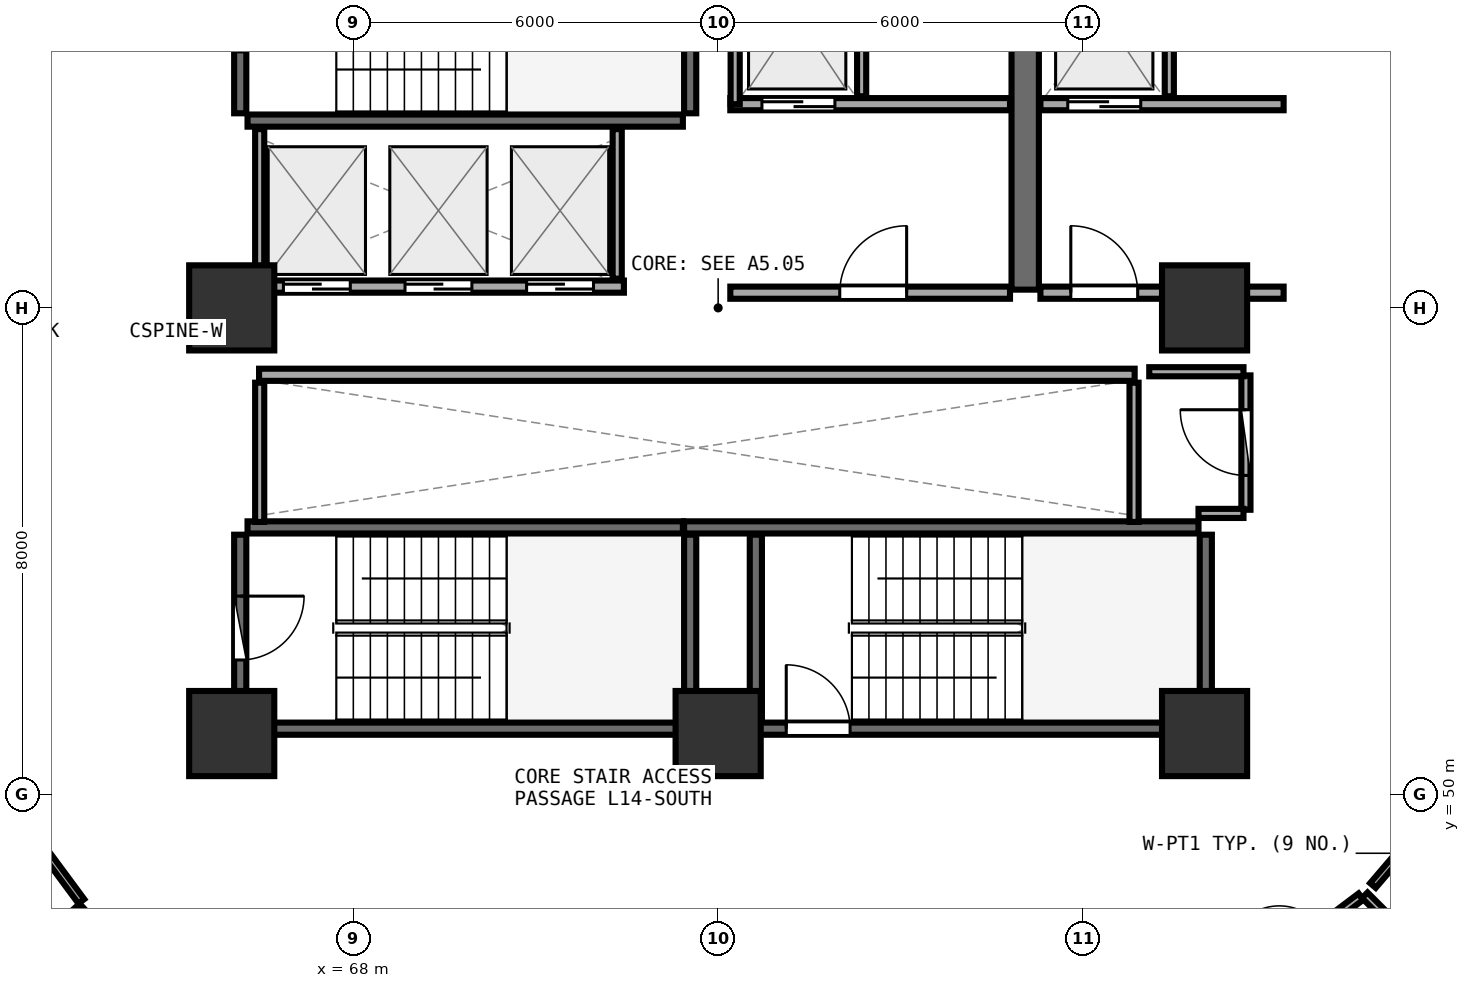
"""IFC4 building model, lengths in metres.
Left out: names, types, materials, properties, quantities, classifications, styles, units other than length and angle.
Written with IfcOpenShell. Run it as: python <this file> out.ifc"""

import sys

from ifc_helpers import new_model, si_unit, direction, frame, frame_2d, origin, origin_2d, place, context, subcontext, project, spatial, rectangle, extrude, element, fill, save


model = new_model("IFC4")
c1 = context("Model", 3, precision=1e-05, world=origin(), true_north=direction((0.0, 1.0)))
c2 = subcontext(c1, "Body", "Model", "MODEL_VIEW")
j1 = project(units=[si_unit("LENGTHUNIT", "METRE"), si_unit("PLANEANGLEUNIT", "RADIAN")], contexts=[c1])
p1 = place(None, origin())
s1 = spatial("IfcSite", under=j1, at=p1, CompositionType="ELEMENT")
p2 = place(p1, origin())
s2 = spatial("IfcBuilding", under=s1, at=p2, CompositionType="ELEMENT")
p3 = place(p2, frame((0.0, 0.0, 56.25)))
s3 = spatial("IfcBuildingStorey", under=s2, at=p3, CompositionType="ELEMENT", Elevation=56.25)
for number, where, z_axis, x_axis in (
    (1, (66.0, 51.0, 0.0), (0.0, 0.0, 1.0), (1.0, 0.0, 0.0)),
    (2, (74.0, 51.0, 0.0), (0.0, 0.0, 1.0), (1.0, 0.0, 0.0)),
    (3, (82.0, 51.0, 0.0), (0.0, 0.0, 1.0), (1.0, 0.0, 0.0)),
    (4, (82.0, 58.0, 0.0), (0.0, 0.0, 1.0), (1.0, 0.0, 0.0)),
    (5, (66.0, 58.0, 0.0), (0.0, 0.0, 1.0), (1.0, 0.0, 0.0)),
):
    element("IfcColumn", number, at=place(p3, frame(where, z_axis=z_axis, x_axis=x_axis)), inside=s3, PredefinedType="PILASTER", context=c2, shape_type="SweptSolid", body=[
        extrude(rectangle(XDim=1.4, YDim=1.4, at=origin_2d()), origin(), (0.0, 0.0, 1.0), 3.75),
    ])
p4 = place(p3, frame((66.26, 61.08, 0.0), z_axis=(0.0, 0.0, 1.0), x_axis=(1.0, 0.0, 0.0)))
e6 = element("IfcWall", 6, at=p4, inside=s3, PredefinedType="SHEAR", context=c2, shape_type="SweptSolid", body=[
    extrude(rectangle(XDim=7.16, YDim=0.2, at=frame_2d((3.58, 0.0))), origin(), (0.0, 0.0, 1.0), 3.49),
])
p5 = place(p3, frame((73.54, 61.2, 0.0), z_axis=(0.0, 0.0, 1.0), x_axis=(0.0, 1.0, 0.0)))
e7 = element("IfcWall", 7, at=p5, inside=s3, PredefinedType="SHEAR", context=c2, shape_type="SweptSolid", body=[
    extrude(rectangle(XDim=3.07, YDim=0.2, at=frame_2d((1.535, 0.0))), origin(), (0.0, 0.0, 1.0), 3.49),
])
p6 = place(p3, frame((66.14, 64.27, 0.0), z_axis=(0.0, 0.0, 1.0), x_axis=(0.0, -1.0, 0.0)))
e8 = element("IfcWall", 8, at=p6, inside=s3, PredefinedType="SHEAR", context=c2, shape_type="SweptSolid", body=[
    extrude(rectangle(XDim=3.07, YDim=0.2, at=frame_2d((1.535, 0.0))), origin(), (0.0, 0.0, 1.0), 3.49),
])
p7 = place(p6, frame((1.01, 0.0, 0.0)))
e9 = element("IfcOpeningElement", 9, at=p7, cuts=e8, PredefinedType="OPENING", context=c2, shape_type="SweptSolid", body=[
    extrude(rectangle(XDim=1.05, YDim=2.1, at=frame_2d((0.525, 1.05))), frame((0.0, 0.11, 0.0), z_axis=(0.0, -1.0, 0.0), x_axis=(1.0, 0.0, 0.0)), (0.0, 0.0, 1.0), 0.22),
])
p8 = place(p3, frame((74.0, 51.08, 0.0), z_axis=(0.0, 0.0, 1.0), x_axis=(1.0, 0.0, 0.0)))
e10 = element("IfcWall", 10, at=p8, inside=s3, PredefinedType="SHEAR", context=c2, shape_type="SweptSolid", body=[
    extrude(rectangle(XDim=7.9, YDim=0.2, at=frame_2d((3.95, 0.0))), origin(), (0.0, 0.0, 1.0), 3.49),
])
p9 = place(p8, frame((1.12, 0.0, 0.0)))
e11 = element("IfcOpeningElement", 11, at=p9, cuts=e10, PredefinedType="OPENING", context=c2, shape_type="SweptSolid", body=[
    extrude(rectangle(XDim=1.05, YDim=2.1, at=frame_2d((0.525, 1.05))), frame((0.0, 0.11, 0.0), z_axis=(0.0, -1.0, 0.0), x_axis=(1.0, 0.0, 0.0)), (0.0, 0.0, 1.0), 0.22),
])
p10 = place(p3, frame((82.02, 51.2, 0.0), z_axis=(0.0, 0.0, 1.0), x_axis=(0.0, 1.0, 0.0)))
e12 = element("IfcWall", 12, at=p10, inside=s3, PredefinedType="SHEAR", context=c2, shape_type="SweptSolid", body=[
    extrude(rectangle(XDim=3.07, YDim=0.2, at=frame_2d((1.535, 0.0))), origin(), (0.0, 0.0, 1.0), 3.49),
])
p11 = place(p3, frame((81.9, 54.39, 0.0), z_axis=(0.0, 0.0, 1.0), x_axis=(-1.0, 0.0, 0.0)))
e13 = element("IfcWall", 13, at=p11, inside=s3, PredefinedType="SHEAR", context=c2, shape_type="SweptSolid", body=[
    extrude(rectangle(XDim=8.46, YDim=0.2, at=frame_2d((4.23, 0.0))), origin(), (0.0, 0.0, 1.0), 3.49),
])
p12 = place(p3, frame((74.62, 54.27, 0.0), z_axis=(0.0, 0.0, 1.0), x_axis=(0.0, -1.0, 0.0)))
e14 = element("IfcWall", 14, at=p12, inside=s3, PredefinedType="SHEAR", context=c2, shape_type="SweptSolid", body=[
    extrude(rectangle(XDim=3.07, YDim=0.2, at=frame_2d((1.535, 0.0))), origin(), (0.0, 0.0, 1.0), 3.49),
])
p13 = place(p3, frame((66.26, 51.08, 0.0), z_axis=(0.0, 0.0, 1.0), x_axis=(1.0, 0.0, 0.0)))
e15 = element("IfcWall", 15, at=p13, inside=s3, PredefinedType="SHEAR", context=c2, shape_type="SweptSolid", body=[
    extrude(rectangle(XDim=7.16, YDim=0.2, at=frame_2d((3.58, 0.0))), origin(), (0.0, 0.0, 1.0), 3.49),
])
p14 = place(p3, frame((73.54, 51.2, 0.0), z_axis=(0.0, 0.0, 1.0), x_axis=(0.0, 1.0, 0.0)))
e16 = element("IfcWall", 16, at=p14, inside=s3, PredefinedType="SHEAR", context=c2, shape_type="SweptSolid", body=[
    extrude(rectangle(XDim=3.07, YDim=0.2, at=frame_2d((1.535, 0.0))), origin(), (0.0, 0.0, 1.0), 3.49),
])
p15 = place(p3, frame((73.42, 54.39, 0.0), z_axis=(0.0, 0.0, 1.0), x_axis=(-1.0, 0.0, 0.0)))
e17 = element("IfcWall", 17, at=p15, inside=s3, PredefinedType="SHEAR", context=c2, shape_type="SweptSolid", body=[
    extrude(rectangle(XDim=7.16, YDim=0.2, at=frame_2d((3.58, 0.0))), origin(), (0.0, 0.0, 1.0), 3.49),
])
p16 = place(p3, frame((66.14, 54.27, 0.0), z_axis=(0.0, 0.0, 1.0), x_axis=(0.0, -1.0, 0.0)))
e18 = element("IfcWall", 18, at=p16, inside=s3, PredefinedType="SHEAR", context=c2, shape_type="SweptSolid", body=[
    extrude(rectangle(XDim=3.07, YDim=0.2, at=frame_2d((1.535, 0.0))), origin(), (0.0, 0.0, 1.0), 3.49),
])
p17 = place(p16, frame((1.01, 0.0, 0.0)))
e19 = element("IfcOpeningElement", 19, at=p17, cuts=e18, PredefinedType="OPENING", context=c2, shape_type="SweptSolid", body=[
    extrude(rectangle(XDim=1.05, YDim=2.1, at=frame_2d((0.525, 1.05))), frame((0.0, 0.11, 0.0), z_axis=(0.0, -1.0, 0.0), x_axis=(1.0, 0.0, 0.0)), (0.0, 0.0, 1.0), 0.22),
])
p18 = place(p3, frame((79.05, 58.3, 0.0), z_axis=(0.0, 0.0, 1.0), x_axis=(0.0, 1.0, 0.0)))
e20 = element("IfcWall", 20, at=p18, inside=s3, PredefinedType="SHEAR", context=c2, shape_type="SweptSolid", body=[
    extrude(rectangle(XDim=6.3, YDim=0.45, at=frame_2d((3.15, 0.0))), origin(), (0.0, 0.0, 1.0), 3.49),
])
p19 = place(p3, frame((74.2, 61.35, 0.0), z_axis=(0.0, 0.0, 1.0), x_axis=(1.0, 0.0, 0.0)))
e21 = element("IfcWall", 21, at=p19, inside=s3, PredefinedType="SOLIDWALL", context=c2, shape_type="SweptSolid", body=[
    extrude(rectangle(XDim=4.6, YDim=0.2, at=frame_2d((2.3, 0.0))), origin(), (0.0, 0.0, 1.0), 3.48),
])
p20 = place(p19, frame((0.52, 0.0, 0.0)))
e22 = element("IfcOpeningElement", 22, at=p20, cuts=e21, PredefinedType="OPENING", context=c2, shape_type="SweptSolid", body=[
    extrude(rectangle(XDim=1.2, YDim=2.15, at=frame_2d((0.6, 1.075))), frame((0.0, 0.11, 0.0), z_axis=(0.0, -1.0, 0.0), x_axis=(1.0, 0.0, 0.0)), (0.0, 0.0, 1.0), 0.22),
])
p21 = place(p3, frame((74.28, 61.35, 0.0), z_axis=(0.0, 0.0, 1.0), x_axis=(0.0, 1.0, 0.0)))
e23 = element("IfcWall", 23, at=p21, inside=s3, PredefinedType="PARTITIONING", context=c2, shape_type="SweptSolid", body=[
    extrude(rectangle(XDim=2.97, YDim=0.15, at=frame_2d((1.485, 0.0))), origin(), (0.0, 0.0, 1.0), 3.48),
])
p22 = place(p3, frame((76.36, 61.48, 0.0), z_axis=(0.0, 0.0, 1.0), x_axis=(0.0, 1.0, 0.0)))
e24 = element("IfcWall", 24, at=p22, inside=s3, PredefinedType="PARTITIONING", context=c2, shape_type="SweptSolid", body=[
    extrude(rectangle(XDim=2.84, YDim=0.15, at=frame_2d((1.42, 0.0))), origin(), (0.0, 0.0, 1.0), 3.48),
])
p23 = place(p3, frame((79.3, 61.35, 0.0), z_axis=(0.0, 0.0, 1.0), x_axis=(1.0, 0.0, 0.0)))
e25 = element("IfcWall", 25, at=p23, inside=s3, PredefinedType="SOLIDWALL", context=c2, shape_type="SweptSolid", body=[
    extrude(rectangle(XDim=4.0, YDim=0.2, at=frame_2d((2.0, 0.0))), origin(), (0.0, 0.0, 1.0), 2.775),
])
p24 = place(p23, frame((0.45, 0.0, 0.0)))
e26 = element("IfcOpeningElement", 26, at=p24, cuts=e25, PredefinedType="OPENING", context=c2, shape_type="SweptSolid", body=[
    extrude(rectangle(XDim=1.2, YDim=2.15, at=frame_2d((0.6, 1.075))), frame((0.0, 0.11, 0.0), z_axis=(0.0, -1.0, 0.0), x_axis=(1.0, 0.0, 0.0)), (0.0, 0.0, 1.0), 0.22),
])
p25 = place(p3, frame((81.42, 61.48, 0.0), z_axis=(0.0, 0.0, 1.0), x_axis=(0.0, 1.0, 0.0)))
e27 = element("IfcWall", 27, at=p25, inside=s3, PredefinedType="PARTITIONING", context=c2, shape_type="SweptSolid", body=[
    extrude(rectangle(XDim=2.84, YDim=0.15, at=frame_2d((1.42, 0.0))), origin(), (0.0, 0.0, 1.0), 3.48),
])
p26 = place(p3, frame((74.2, 58.25, 0.0), z_axis=(0.0, 0.0, 1.0), x_axis=(1.0, 0.0, 0.0)))
e28 = element("IfcWall", 28, at=p26, inside=s3, PredefinedType="SOLIDWALL", context=c2, shape_type="SweptSolid", body=[
    extrude(rectangle(XDim=4.6, YDim=0.2, at=frame_2d((2.3, 0.0))), origin(), (0.0, 0.0, 1.0), 3.48),
])
p27 = place(p26, frame((1.8, 0.0, 0.0)))
e29 = element("IfcOpeningElement", 29, at=p27, cuts=e28, PredefinedType="OPENING", context=c2, shape_type="SweptSolid", body=[
    extrude(rectangle(XDim=1.1, YDim=2.1, at=frame_2d((0.55, 1.05))), frame((0.0, 0.11, 0.0), z_axis=(0.0, -1.0, 0.0), x_axis=(1.0, 0.0, 0.0)), (0.0, 0.0, 1.0), 0.22),
])
p28 = place(p3, frame((79.3, 58.25, 0.0), z_axis=(0.0, 0.0, 1.0), x_axis=(1.0, 0.0, 0.0)))
e30 = element("IfcWall", 30, at=p28, inside=s3, PredefinedType="SOLIDWALL", context=c2, shape_type="SweptSolid", body=[
    extrude(rectangle(XDim=4.0, YDim=0.2, at=frame_2d((2.0, 0.0))), origin(), (0.0, 0.0, 1.0), 2.775),
])
p29 = place(p28, frame((0.5, 0.0, 0.0)))
e31 = element("IfcOpeningElement", 31, at=p29, cuts=e30, PredefinedType="OPENING", context=c2, shape_type="SweptSolid", body=[
    extrude(rectangle(XDim=1.1, YDim=2.1, at=frame_2d((0.55, 1.05))), frame((0.0, 0.11, 0.0), z_axis=(0.0, -1.0, 0.0), x_axis=(1.0, 0.0, 0.0)), (0.0, 0.0, 1.0), 0.22),
])
p30 = place(p3, frame((66.45, 58.35, 0.0), z_axis=(0.0, 0.0, 1.0), x_axis=(1.0, 0.0, 0.0)))
e32 = element("IfcWall", 32, at=p30, inside=s3, PredefinedType="SOLIDWALL", context=c2, shape_type="SweptSolid", body=[
    extrude(rectangle(XDim=6.0, YDim=0.2, at=frame_2d((3.0, 0.0))), origin(), (0.0, 0.0, 1.0), 3.48),
])
p31 = place(p30, frame((0.4, 0.0, 0.0)))
e33 = element("IfcOpeningElement", 33, at=p31, cuts=e32, PredefinedType="OPENING", context=c2, shape_type="SweptSolid", body=[
    extrude(rectangle(XDim=1.1, YDim=2.1, at=frame_2d((0.55, 1.05))), frame((0.0, 0.11, 0.0), z_axis=(0.0, -1.0, 0.0), x_axis=(1.0, 0.0, 0.0)), (0.0, 0.0, 1.0), 0.22),
])
p32 = place(p30, frame((2.4, 0.0, 0.0)))
e34 = element("IfcOpeningElement", 34, at=p32, cuts=e32, PredefinedType="OPENING", context=c2, shape_type="SweptSolid", body=[
    extrude(rectangle(XDim=1.1, YDim=2.1, at=frame_2d((0.55, 1.05))), frame((0.0, 0.11, 0.0), z_axis=(0.0, -1.0, 0.0), x_axis=(1.0, 0.0, 0.0)), (0.0, 0.0, 1.0), 0.22),
])
p33 = place(p30, frame((4.4, 0.0, 0.0)))
e35 = element("IfcOpeningElement", 35, at=p33, cuts=e32, PredefinedType="OPENING", context=c2, shape_type="SweptSolid", body=[
    extrude(rectangle(XDim=1.1, YDim=2.1, at=frame_2d((0.55, 1.05))), frame((0.0, 0.11, 0.0), z_axis=(0.0, -1.0, 0.0), x_axis=(1.0, 0.0, 0.0)), (0.0, 0.0, 1.0), 0.22),
])
for number, where, z_axis, x_axis in (
    (36, (66.46, 58.48, 0.0), (0.0, 0.0, 1.0), (0.0, 1.0, 0.0)),
    (37, (72.34, 58.48, 0.0), (0.0, 0.0, 1.0), (0.0, 1.0, 0.0)),
):
    element("IfcWall", number, at=place(p3, frame(where, z_axis=z_axis, x_axis=x_axis)), inside=s3, PredefinedType="PARTITIONING", context=c2, shape_type="SweptSolid", body=[
        extrude(rectangle(XDim=2.46, YDim=0.15, at=frame_2d((1.23, 0.0))), origin(), (0.0, 0.0, 1.0), 3.48),
    ])
p34 = place(p3, frame((66.45, 56.9, 0.0), z_axis=(0.0, 0.0, 1.0), x_axis=(1.0, 0.0, 0.0)))
e38 = element("IfcWall", 38, at=p34, inside=s3, PredefinedType="SOLIDWALL", context=c2, shape_type="SweptSolid", body=[
    extrude(rectangle(XDim=14.4, YDim=0.2, at=frame_2d((7.2, 0.0))), origin(), (0.0, 0.0, 1.0), 3.48),
])
for number, where, z_axis, x_axis in (
    (39, (66.46, 54.48, 0.0), (0.0, 0.0, 1.0), (0.0, 1.0, 0.0)),
    (40, (80.84, 54.48, 0.0), (0.0, 0.0, 1.0), (0.0, 1.0, 0.0)),
):
    element("IfcWall", number, at=place(p3, frame(where, z_axis=z_axis, x_axis=x_axis)), inside=s3, PredefinedType="PARTITIONING", context=c2, shape_type="SweptSolid", body=[
        extrude(rectangle(XDim=2.29, YDim=0.15, at=frame_2d((1.145, 0.0))), origin(), (0.0, 0.0, 1.0), 3.48),
    ])
p35 = place(p3, frame((82.68, 54.68, 0.0), z_axis=(0.0, 0.0, 1.0), x_axis=(0.0, 1.0, 0.0)))
e41 = element("IfcWall", 41, at=p35, inside=s3, PredefinedType="PARTITIONING", context=c2, shape_type="SweptSolid", body=[
    extrude(rectangle(XDim=2.21, YDim=0.15, at=frame_2d((1.105, 0.0))), origin(), (0.0, 0.0, 1.0), 3.48),
])
p36 = place(p35, frame((0.565, 0.0, 0.0)))
e42 = element("IfcOpeningElement", 42, at=p36, cuts=e41, PredefinedType="OPENING", context=c2, shape_type="SweptSolid", body=[
    extrude(rectangle(XDim=1.08, YDim=2.1, at=frame_2d((0.54, 1.05))), frame((0.0, 0.085, 0.0), z_axis=(0.0, -1.0, 0.0), x_axis=(1.0, 0.0, 0.0)), (0.0, 0.0, 1.0), 0.17),
])
p37 = place(p3, frame((60.071, 52.912, 0.0), z_axis=(0.0, 0.0, 1.0), x_axis=(0.594763174801, -0.80390096772, 0.0)))
e43 = element("IfcWall", 43, at=p37, inside=s3, PredefinedType="PARTITIONING", context=c2, shape_type="SweptSolid", body=[
    extrude(rectangle(XDim=5.81, YDim=0.12, at=frame_2d((2.905, 0.0))), origin(), (0.0, 0.0, 1.0), 2.875),
])
p38 = place(p37, frame((2.455, 0.0, 0.0)))
e44 = element("IfcOpeningElement", 44, at=p38, cuts=e43, PredefinedType="OPENING", context=c2, shape_type="SweptSolid", body=[
    extrude(rectangle(XDim=0.9, YDim=2.08, at=frame_2d((0.45, 1.04))), frame((0.0, 0.07, 0.0), z_axis=(0.0, -1.0, 0.0), x_axis=(1.0, 0.0, 0.0)), (0.0, 0.0, 1.0), 0.14),
])
p39 = place(p3, frame((82.573, 46.811, 0.0), z_axis=(0.0, 0.0, 1.0), x_axis=(0.7983589592, 0.602181843188, 0.0)))
e45 = element("IfcWall", 45, at=p39, inside=s3, PredefinedType="PLUMBINGWALL", context=c2, shape_type="SweptSolid", body=[
    extrude(rectangle(XDim=2.504, YDim=0.13, at=frame_2d((1.252, 0.0))), origin(), (0.0, 0.0, 1.0), 2.875),
])
p40 = place(p39, frame((0.822, 0.0, 0.0)))
e46 = element("IfcOpeningElement", 46, at=p40, cuts=e45, PredefinedType="OPENING", context=c2, shape_type="SweptSolid", body=[
    extrude(rectangle(XDim=0.86, YDim=2.05, at=frame_2d((0.43, 1.025))), frame((0.0, 0.075, 0.0), z_axis=(0.0, -1.0, 0.0), x_axis=(1.0, 0.0, 0.0)), (0.0, 0.0, 1.0), 0.15),
])
p41 = place(p3, frame((84.769, 48.502, 0.0), z_axis=(0.0, 0.0, 1.0), x_axis=(0.649870238328, 0.760045178483, 0.0)))
e47 = element("IfcWall", 47, at=p41, inside=s3, PredefinedType="PARTITIONING", context=c2, shape_type="SweptSolid", body=[
    extrude(rectangle(XDim=3.167, YDim=0.12, at=frame_2d((1.583, 0.0))), origin(), (0.0, 0.0, 1.0), 2.875),
])
p42 = place(p41, frame((1.133, 0.0, 0.0)))
e48 = element("IfcOpeningElement", 48, at=p42, cuts=e47, PredefinedType="OPENING", context=c2, shape_type="SweptSolid", body=[
    extrude(rectangle(XDim=0.9, YDim=2.08, at=frame_2d((0.45, 1.04))), frame((0.0, 0.07, 0.0), z_axis=(0.0, -1.0, 0.0), x_axis=(1.0, 0.0, 0.0)), (0.0, 0.0, 1.0), 0.14),
])
p43 = place(p3, frame((81.9, 54.62, 0.0), z_axis=(0.0, 0.0, 1.0), x_axis=(1.0, 0.0, 0.0)))
e49 = element("IfcWall", 49, at=p43, inside=s3, PredefinedType="PARTITIONING", context=c2, shape_type="SweptSolid", body=[
    extrude(rectangle(XDim=0.74, YDim=0.15, at=frame_2d((0.37, 0.0))), origin(), (0.0, 0.0, 1.0), 2.775),
])
p44 = place(p3, frame((82.64, 56.95, 0.0), z_axis=(0.0, 0.0, 1.0), x_axis=(-1.0, 0.0, 0.0)))
e50 = element("IfcWall", 50, at=p44, inside=s3, PredefinedType="PARTITIONING", context=c2, shape_type="SweptSolid", body=[
    extrude(rectangle(XDim=1.55, YDim=0.15, at=frame_2d((0.775, 0.0))), origin(), (0.0, 0.0, 1.0), 2.775),
])
p45 = place(p3, frame((63.532, 48.166, 0.0), z_axis=(0.0, 0.0, 1.0), x_axis=(-0.742191353367, -0.670188029577, 0.0)))
e51 = element("IfcWall", 51, at=p45, inside=s3, PredefinedType="PARTITIONING", context=c2, shape_type="SweptSolid", body=[
    extrude(rectangle(XDim=11.569, YDim=0.1, at=frame_2d((5.785, 0.0))), origin(), (0.0, 0.0, 1.0), 2.875),
])
p46 = place(p3, frame((84.634, 48.341, 0.0), z_axis=(0.0, 0.0, 1.0), x_axis=(0.706525219412, -0.707687865047, 0.0)))
e52 = element("IfcWall", 52, at=p46, inside=s3, PredefinedType="PLUMBINGWALL", context=c2, shape_type="SweptSolid", body=[
    extrude(rectangle(XDim=3.36, YDim=0.13, at=frame_2d((1.68, 0.0))), origin(), (0.0, 0.0, 1.0), 3.235),
])
p47 = place(p9, origin())
e53 = element("IfcDoor", 53, at=p47, inside=s3, OperationType="SINGLE_SWING_LEFT", PredefinedType="DOOR", context=c2, shape_type="SweptSolid", body=[
    extrude(rectangle(XDim=1.05, YDim=2.1, at=frame_2d((0.525, 1.05))), frame((0.0, 0.025, 0.0), z_axis=(0.0, -1.0, 0.0), x_axis=(1.0, 0.0, 0.0)), (0.0, 0.0, 1.0), 0.05),
])
fill(e11, e53)
p48 = place(p17, origin())
e54 = element("IfcDoor", 54, at=p48, inside=s3, OperationType="SINGLE_SWING_LEFT", PredefinedType="DOOR", context=c2, shape_type="SweptSolid", body=[
    extrude(rectangle(XDim=1.05, YDim=2.1, at=frame_2d((0.525, 1.05))), frame((0.0, 0.025, 0.0), z_axis=(0.0, -1.0, 0.0), x_axis=(1.0, 0.0, 0.0)), (0.0, 0.0, 1.0), 0.05),
])
fill(e19, e54)
p49 = place(p20, origin())
e55 = element("IfcDoor", 55, at=p49, inside=s3, OperationType="DOUBLE_DOOR_SLIDING", PredefinedType="DOOR", context=c2, shape_type="SweptSolid", body=[
    extrude(rectangle(XDim=1.2, YDim=2.15, at=frame_2d((0.6, 1.075))), frame((0.0, 0.025, 0.0), z_axis=(0.0, -1.0, 0.0), x_axis=(1.0, 0.0, 0.0)), (0.0, 0.0, 1.0), 0.05),
])
fill(e22, e55)
p50 = place(p24, origin())
e56 = element("IfcDoor", 56, at=p50, inside=s3, OperationType="DOUBLE_DOOR_SLIDING", PredefinedType="DOOR", context=c2, shape_type="SweptSolid", body=[
    extrude(rectangle(XDim=1.2, YDim=2.15, at=frame_2d((0.6, 1.075))), frame((0.0, 0.025, 0.0), z_axis=(0.0, -1.0, 0.0), x_axis=(1.0, 0.0, 0.0)), (0.0, 0.0, 1.0), 0.05),
])
fill(e26, e56)
p51 = place(p27, frame((1.1, 0.0, 0.0), z_axis=(0.0, 0.0, 1.0), x_axis=(-1.0, 0.0, 0.0)))
e57 = element("IfcDoor", 57, at=p51, inside=s3, OperationType="SINGLE_SWING_LEFT", PredefinedType="DOOR", context=c2, shape_type="SweptSolid", body=[
    extrude(rectangle(XDim=1.1, YDim=2.1, at=frame_2d((0.55, 1.05))), frame((0.0, 0.025, 0.0), z_axis=(0.0, -1.0, 0.0), x_axis=(1.0, 0.0, 0.0)), (0.0, 0.0, 1.0), 0.05),
])
fill(e29, e57)
p52 = place(p29, frame((1.1, 0.0, 0.0), z_axis=(0.0, 0.0, 1.0), x_axis=(-1.0, 0.0, 0.0)))
e58 = element("IfcDoor", 58, at=p52, inside=s3, OperationType="SINGLE_SWING_RIGHT", PredefinedType="DOOR", context=c2, shape_type="SweptSolid", body=[
    extrude(rectangle(XDim=1.1, YDim=2.1, at=frame_2d((0.55, 1.05))), frame((0.0, 0.025, 0.0), z_axis=(0.0, -1.0, 0.0), x_axis=(1.0, 0.0, 0.0)), (0.0, 0.0, 1.0), 0.05),
])
fill(e31, e58)
p53 = place(p31, origin())
e59 = element("IfcDoor", 59, at=p53, inside=s3, OperationType="DOUBLE_DOOR_SLIDING", PredefinedType="DOOR", context=c2, shape_type="SweptSolid", body=[
    extrude(rectangle(XDim=1.1, YDim=2.1, at=frame_2d((0.55, 1.05))), frame((0.0, 0.025, 0.0), z_axis=(0.0, -1.0, 0.0), x_axis=(1.0, 0.0, 0.0)), (0.0, 0.0, 1.0), 0.05),
])
fill(e33, e59)
p54 = place(p32, origin())
e60 = element("IfcDoor", 60, at=p54, inside=s3, OperationType="DOUBLE_DOOR_SLIDING", PredefinedType="DOOR", context=c2, shape_type="SweptSolid", body=[
    extrude(rectangle(XDim=1.1, YDim=2.1, at=frame_2d((0.55, 1.05))), frame((0.0, 0.025, 0.0), z_axis=(0.0, -1.0, 0.0), x_axis=(1.0, 0.0, 0.0)), (0.0, 0.0, 1.0), 0.05),
])
fill(e34, e60)
p55 = place(p33, origin())
e61 = element("IfcDoor", 61, at=p55, inside=s3, OperationType="DOUBLE_DOOR_SLIDING", PredefinedType="DOOR", context=c2, shape_type="SweptSolid", body=[
    extrude(rectangle(XDim=1.1, YDim=2.1, at=frame_2d((0.55, 1.05))), frame((0.0, 0.025, 0.0), z_axis=(0.0, -1.0, 0.0), x_axis=(1.0, 0.0, 0.0)), (0.0, 0.0, 1.0), 0.05),
])
fill(e35, e61)
p56 = place(p36, origin())
e62 = element("IfcDoor", 62, at=p56, inside=s3, OperationType="SINGLE_SWING_RIGHT", PredefinedType="DOOR", context=c2, shape_type="SweptSolid", body=[
    extrude(rectangle(XDim=1.08, YDim=2.1, at=frame_2d((0.54, 1.05))), frame((0.0, 0.025, 0.0), z_axis=(0.0, -1.0, 0.0), x_axis=(1.0, 0.0, 0.0)), (0.0, 0.0, 1.0), 0.05),
])
fill(e42, e62)
save(model, sys.argv[1])
